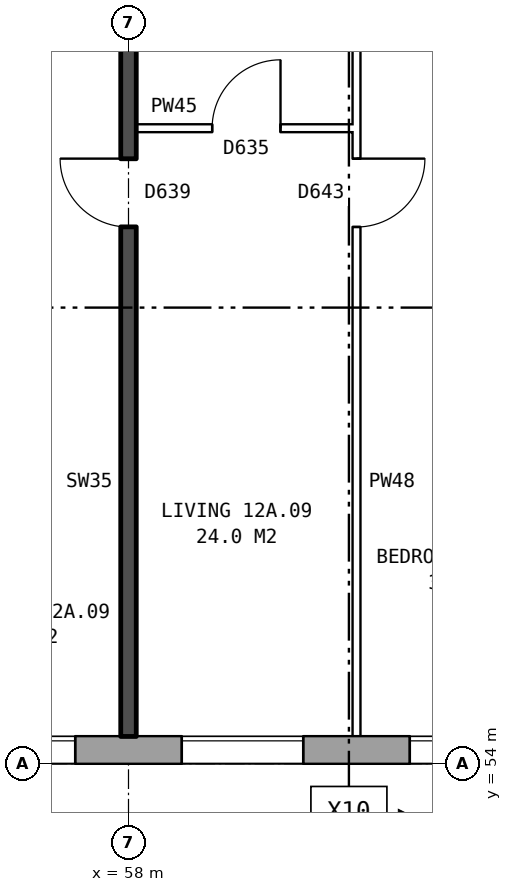
"""IFC4 building model, lengths in metres.
Left out: names, types, materials, properties, quantities, classifications, styles, units other than length and angle.
Written with IfcOpenShell. Run it as: python <this file> out.ifc"""

import sys

from ifc_helpers import new_model, si_unit, direction, frame, frame_2d, origin, place, context, subcontext, project, spatial, rectangle, extrude, element, fill, save


model = new_model("IFC4")
c1 = context("Model", 3, precision=1e-05, world=origin(), true_north=direction((0.0, 1.0)))
c2 = subcontext(c1, "Body", "Model", "MODEL_VIEW")
j1 = project(units=[si_unit("LENGTHUNIT", "METRE"), si_unit("PLANEANGLEUNIT", "RADIAN")], contexts=[c1])
p1 = place(None, origin())
s1 = spatial("IfcSite", under=j1, at=p1, CompositionType="ELEMENT")
p2 = place(p1, origin())
s2 = spatial("IfcBuilding", under=s1, at=p2, CompositionType="ELEMENT")
p3 = place(p2, frame((0.0, 0.0, 47.4)))
s3 = spatial("IfcBuildingStorey", under=s2, at=p3, CompositionType="ELEMENT", Elevation=47.4)
p4 = place(p3, frame((24.575, 54.18, 0.0), z_axis=(0.0, 0.0, 1.0), x_axis=(1.0, 0.0, 0.0)))
e1 = element("IfcWall", 1, at=p4, inside=s3, PredefinedType="STANDARD", context=c2, shape_type="SweptSolid", body=[
    extrude(rectangle(XDim=48.351, YDim=0.36, at=frame_2d((24.175, 0.0))), origin(), (0.0, 0.0, 1.0), 2.85),
])
p5 = place(p4, frame((1.125, 0.0, 0.8)))
e2 = element("IfcOpeningElement", 2, at=p5, cuts=e1, PredefinedType="OPENING", context=c2, shape_type="SweptSolid", body=[
    extrude(rectangle(XDim=1.6, YDim=1.8, at=frame_2d((0.8, 0.9))), frame((0.0, 0.19, 0.0), z_axis=(0.0, -1.0, 0.0), x_axis=(1.0, 0.0, 0.0)), (0.0, 0.0, 1.0), 0.38),
])
p6 = place(p4, frame((5.625, 0.0, 0.8)))
e3 = element("IfcOpeningElement", 3, at=p6, cuts=e1, PredefinedType="OPENING", context=c2, shape_type="SweptSolid", body=[
    extrude(rectangle(XDim=1.2, YDim=1.2, at=frame_2d((0.6, 0.6))), frame((0.0, 0.19, 0.0), z_axis=(0.0, -1.0, 0.0), x_axis=(1.0, 0.0, 0.0)), (0.0, 0.0, 1.0), 0.38),
])
p7 = place(p4, frame((7.125, 0.0, 0.8)))
e4 = element("IfcOpeningElement", 4, at=p7, cuts=e1, PredefinedType="OPENING", context=c2, shape_type="SweptSolid", body=[
    extrude(rectangle(XDim=1.6, YDim=1.8, at=frame_2d((0.8, 0.9))), frame((0.0, 0.19, 0.0), z_axis=(0.0, -1.0, 0.0), x_axis=(1.0, 0.0, 0.0)), (0.0, 0.0, 1.0), 0.38),
])
p8 = place(p4, frame((10.125, 0.0, 0.8)))
e5 = element("IfcOpeningElement", 5, at=p8, cuts=e1, PredefinedType="OPENING", context=c2, shape_type="SweptSolid", body=[
    extrude(rectangle(XDim=1.6, YDim=1.8, at=frame_2d((0.8, 0.9))), frame((0.0, 0.19, 0.0), z_axis=(0.0, -1.0, 0.0), x_axis=(1.0, 0.0, 0.0)), (0.0, 0.0, 1.0), 0.38),
])
p9 = place(p4, frame((13.125, 0.0, 0.8)))
e6 = element("IfcOpeningElement", 6, at=p9, cuts=e1, PredefinedType="OPENING", context=c2, shape_type="SweptSolid", body=[
    extrude(rectangle(XDim=1.6, YDim=1.8, at=frame_2d((0.8, 0.9))), frame((0.0, 0.19, 0.0), z_axis=(0.0, -1.0, 0.0), x_axis=(1.0, 0.0, 0.0)), (0.0, 0.0, 1.0), 0.38),
])
p10 = place(p4, frame((16.125, 0.0, 0.8)))
e7 = element("IfcOpeningElement", 7, at=p10, cuts=e1, PredefinedType="OPENING", context=c2, shape_type="SweptSolid", body=[
    extrude(rectangle(XDim=1.6, YDim=1.8, at=frame_2d((0.8, 0.9))), frame((0.0, 0.19, 0.0), z_axis=(0.0, -1.0, 0.0), x_axis=(1.0, 0.0, 0.0)), (0.0, 0.0, 1.0), 0.38),
])
p11 = place(p4, frame((19.125, 0.0, 0.8)))
e8 = element("IfcOpeningElement", 8, at=p11, cuts=e1, PredefinedType="OPENING", context=c2, shape_type="SweptSolid", body=[
    extrude(rectangle(XDim=1.6, YDim=1.8, at=frame_2d((0.8, 0.9))), frame((0.0, 0.19, 0.0), z_axis=(0.0, -1.0, 0.0), x_axis=(1.0, 0.0, 0.0)), (0.0, 0.0, 1.0), 0.38),
])
p12 = place(p4, frame((22.125, 0.0, 0.8)))
e9 = element("IfcOpeningElement", 9, at=p12, cuts=e1, PredefinedType="OPENING", context=c2, shape_type="SweptSolid", body=[
    extrude(rectangle(XDim=1.6, YDim=1.8, at=frame_2d((0.8, 0.9))), frame((0.0, 0.19, 0.0), z_axis=(0.0, -1.0, 0.0), x_axis=(1.0, 0.0, 0.0)), (0.0, 0.0, 1.0), 0.38),
])
p13 = place(p4, frame((25.125, 0.0, 0.8)))
e10 = element("IfcOpeningElement", 10, at=p13, cuts=e1, PredefinedType="OPENING", context=c2, shape_type="SweptSolid", body=[
    extrude(rectangle(XDim=1.6, YDim=1.8, at=frame_2d((0.8, 0.9))), frame((0.0, 0.19, 0.0), z_axis=(0.0, -1.0, 0.0), x_axis=(1.0, 0.0, 0.0)), (0.0, 0.0, 1.0), 0.38),
])
p14 = place(p4, frame((28.125, 0.0, 0.8)))
e11 = element("IfcOpeningElement", 11, at=p14, cuts=e1, PredefinedType="OPENING", context=c2, shape_type="SweptSolid", body=[
    extrude(rectangle(XDim=1.6, YDim=1.8, at=frame_2d((0.8, 0.9))), frame((0.0, 0.19, 0.0), z_axis=(0.0, -1.0, 0.0), x_axis=(1.0, 0.0, 0.0)), (0.0, 0.0, 1.0), 0.38),
])
p15 = place(p4, frame((31.125, 0.0, 0.8)))
e12 = element("IfcOpeningElement", 12, at=p15, cuts=e1, PredefinedType="OPENING", context=c2, shape_type="SweptSolid", body=[
    extrude(rectangle(XDim=1.6, YDim=1.8, at=frame_2d((0.8, 0.9))), frame((0.0, 0.19, 0.0), z_axis=(0.0, -1.0, 0.0), x_axis=(1.0, 0.0, 0.0)), (0.0, 0.0, 1.0), 0.38),
])
p16 = place(p4, frame((34.125, 0.0, 0.8)))
e13 = element("IfcOpeningElement", 13, at=p16, cuts=e1, PredefinedType="OPENING", context=c2, shape_type="SweptSolid", body=[
    extrude(rectangle(XDim=1.6, YDim=1.8, at=frame_2d((0.8, 0.9))), frame((0.0, 0.19, 0.0), z_axis=(0.0, -1.0, 0.0), x_axis=(1.0, 0.0, 0.0)), (0.0, 0.0, 1.0), 0.38),
])
p17 = place(p4, frame((37.125, 0.0, 0.8)))
e14 = element("IfcOpeningElement", 14, at=p17, cuts=e1, PredefinedType="OPENING", context=c2, shape_type="SweptSolid", body=[
    extrude(rectangle(XDim=1.6, YDim=1.8, at=frame_2d((0.8, 0.9))), frame((0.0, 0.19, 0.0), z_axis=(0.0, -1.0, 0.0), x_axis=(1.0, 0.0, 0.0)), (0.0, 0.0, 1.0), 0.38),
])
p18 = place(p4, frame((40.125, 0.0, 0.8)))
e15 = element("IfcOpeningElement", 15, at=p18, cuts=e1, PredefinedType="OPENING", context=c2, shape_type="SweptSolid", body=[
    extrude(rectangle(XDim=1.6, YDim=1.8, at=frame_2d((0.8, 0.9))), frame((0.0, 0.19, 0.0), z_axis=(0.0, -1.0, 0.0), x_axis=(1.0, 0.0, 0.0)), (0.0, 0.0, 1.0), 0.38),
])
p19 = place(p4, frame((42.025, 0.0, 0.8)))
e16 = element("IfcOpeningElement", 16, at=p19, cuts=e1, PredefinedType="OPENING", context=c2, shape_type="SweptSolid", body=[
    extrude(rectangle(XDim=1.0, YDim=0.9, at=frame_2d((0.5, 0.45))), frame((0.0, 0.19, 0.0), z_axis=(0.0, -1.0, 0.0), x_axis=(1.0, 0.0, 0.0)), (0.0, 0.0, 1.0), 0.38),
])
p20 = place(p4, frame((46.125, 0.0, 0.8)))
e17 = element("IfcOpeningElement", 17, at=p20, cuts=e1, PredefinedType="OPENING", context=c2, shape_type="SweptSolid", body=[
    extrude(rectangle(XDim=1.6, YDim=1.8, at=frame_2d((0.8, 0.9))), frame((0.0, 0.19, 0.0), z_axis=(0.0, -1.0, 0.0), x_axis=(1.0, 0.0, 0.0)), (0.0, 0.0, 1.0), 0.38),
])
p21 = place(p4, frame((44.525, 0.0, 1.7)))
e18 = element("IfcOpeningElement", 18, at=p21, cuts=e1, PredefinedType="OPENING", context=c2, shape_type="SweptSolid", body=[
    extrude(rectangle(XDim=0.6, YDim=0.9, at=frame_2d((0.3, 0.45))), frame((0.0, 0.19, 0.0), z_axis=(0.0, -1.0, 0.0), x_axis=(1.0, 0.0, 0.0)), (0.0, 0.0, 1.0), 0.38),
])
p22 = place(p3, frame((58.1, 62.36, 0.0), z_axis=(0.0, 0.0, 1.0), x_axis=(1.0, 0.0, 0.0)))
e19 = element("IfcWall", 19, at=p22, inside=s3, PredefinedType="PARTITIONING", context=c2, shape_type="SweptSolid", body=[
    extrude(rectangle(XDim=2.9, YDim=0.1, at=frame_2d((1.45, 0.0))), origin(), (0.0, 0.0, 1.0), 2.85),
])
p23 = place(p22, frame((1.0, 0.0, 0.0)))
e20 = element("IfcOpeningElement", 20, at=p23, cuts=e19, PredefinedType="OPENING", context=c2, shape_type="SweptSolid", body=[
    extrude(rectangle(XDim=0.9, YDim=2.1, at=frame_2d((0.45, 1.05))), frame((0.0, 0.06, 0.0), z_axis=(0.0, -1.0, 0.0), x_axis=(1.0, 0.0, 0.0)), (0.0, 0.0, 1.0), 0.12),
])
p24 = place(p3, frame((58.0, 54.36, 0.0), z_axis=(0.0, 0.0, 1.0), x_axis=(0.0, 1.0, 0.0)))
e21 = element("IfcWall", 21, at=p24, inside=s3, PredefinedType="SOLIDWALL", context=c2, shape_type="SweptSolid", body=[
    extrude(rectangle(XDim=14.44, YDim=0.2, at=frame_2d((7.22, 0.0))), origin(), (0.0, 0.0, 1.0), 2.85),
])
p25 = place(p24, frame((6.7, 0.0, 0.0)))
e22 = element("IfcOpeningElement", 22, at=p25, cuts=e21, PredefinedType="OPENING", context=c2, shape_type="SweptSolid", body=[
    extrude(rectangle(XDim=0.9, YDim=2.1, at=frame_2d((0.45, 1.05))), frame((0.0, 0.11, 0.0), z_axis=(0.0, -1.0, 0.0), x_axis=(1.0, 0.0, 0.0)), (0.0, 0.0, 1.0), 0.22),
])
p26 = place(p24, frame((13.14, 0.0, 0.0)))
e23 = element("IfcOpeningElement", 23, at=p26, cuts=e21, PredefinedType="OPENING", context=c2, shape_type="SweptSolid", body=[
    extrude(rectangle(XDim=0.9, YDim=2.1, at=frame_2d((0.45, 1.05))), frame((0.0, 0.11, 0.0), z_axis=(0.0, -1.0, 0.0), x_axis=(1.0, 0.0, 0.0)), (0.0, 0.0, 1.0), 0.22),
])
p27 = place(p3, frame((61.0, 54.36, 0.0), z_axis=(0.0, 0.0, 1.0), x_axis=(0.0, 1.0, 0.0)))
e24 = element("IfcWall", 24, at=p27, inside=s3, PredefinedType="PARTITIONING", context=c2, shape_type="SweptSolid", body=[
    extrude(rectangle(XDim=14.34, YDim=0.1, at=frame_2d((7.17, 0.0))), origin(), (0.0, 0.0, 1.0), 2.85),
])
p28 = place(p27, frame((6.7, 0.0, 0.0)))
e25 = element("IfcOpeningElement", 25, at=p28, cuts=e24, PredefinedType="OPENING", context=c2, shape_type="SweptSolid", body=[
    extrude(rectangle(XDim=0.9, YDim=2.1, at=frame_2d((0.45, 1.05))), frame((0.0, 0.06, 0.0), z_axis=(0.0, -1.0, 0.0), x_axis=(1.0, 0.0, 0.0)), (0.0, 0.0, 1.0), 0.12),
])
p29 = place(p27, frame((13.04, 0.0, 0.0)))
e26 = element("IfcOpeningElement", 26, at=p29, cuts=e24, PredefinedType="OPENING", context=c2, shape_type="SweptSolid", body=[
    extrude(rectangle(XDim=0.9, YDim=2.1, at=frame_2d((0.45, 1.05))), frame((0.0, 0.06, 0.0), z_axis=(0.0, -1.0, 0.0), x_axis=(1.0, 0.0, 0.0)), (0.0, 0.0, 1.0), 0.12),
])
p30 = place(p15, origin())
e27 = element("IfcWindow", 27, at=p30, inside=s3, PartitioningType="SINGLE_PANEL", PredefinedType="WINDOW", context=c2, shape_type="SweptSolid", body=[
    extrude(rectangle(XDim=1.6, YDim=1.8, at=frame_2d((0.8, 0.9))), frame((0.0, 0.15, 0.0), z_axis=(0.0, -1.0, 0.0), x_axis=(1.0, 0.0, 0.0)), (0.0, 0.0, 1.0), 0.06),
])
fill(e12, e27)
p31 = place(p16, origin())
e28 = element("IfcWindow", 28, at=p31, inside=s3, PartitioningType="SINGLE_PANEL", PredefinedType="WINDOW", context=c2, shape_type="SweptSolid", body=[
    extrude(rectangle(XDim=1.6, YDim=1.8, at=frame_2d((0.8, 0.9))), frame((0.0, 0.15, 0.0), z_axis=(0.0, -1.0, 0.0), x_axis=(1.0, 0.0, 0.0)), (0.0, 0.0, 1.0), 0.06),
])
fill(e13, e28)
p32 = place(p17, origin())
e29 = element("IfcWindow", 29, at=p32, inside=s3, PartitioningType="SINGLE_PANEL", PredefinedType="WINDOW", context=c2, shape_type="SweptSolid", body=[
    extrude(rectangle(XDim=1.6, YDim=1.8, at=frame_2d((0.8, 0.9))), frame((0.0, 0.15, 0.0), z_axis=(0.0, -1.0, 0.0), x_axis=(1.0, 0.0, 0.0)), (0.0, 0.0, 1.0), 0.06),
])
fill(e14, e29)
p33 = place(p28, frame((0.9, 0.0, 0.0), z_axis=(0.0, 0.0, 1.0), x_axis=(-1.0, 0.0, 0.0)))
e30 = element("IfcDoor", 30, at=p33, inside=s3, OperationType="SINGLE_SWING_LEFT", PredefinedType="DOOR", context=c2, shape_type="SweptSolid", body=[
    extrude(rectangle(XDim=0.9, YDim=2.1, at=frame_2d((0.45, 1.05))), frame((0.0, 0.025, 0.0), z_axis=(0.0, -1.0, 0.0), x_axis=(1.0, 0.0, 0.0)), (0.0, 0.0, 1.0), 0.05),
])
fill(e25, e30)
p34 = place(p25, origin())
e31 = element("IfcDoor", 31, at=p34, inside=s3, OperationType="SINGLE_SWING_RIGHT", PredefinedType="DOOR", context=c2, shape_type="SweptSolid", body=[
    extrude(rectangle(XDim=0.9, YDim=2.1, at=frame_2d((0.45, 1.05))), frame((0.0, 0.025, 0.0), z_axis=(0.0, -1.0, 0.0), x_axis=(1.0, 0.0, 0.0)), (0.0, 0.0, 1.0), 0.05),
])
fill(e22, e31)
p35 = place(p23, origin())
e32 = element("IfcDoor", 32, at=p35, inside=s3, OperationType="SINGLE_SWING_RIGHT", PredefinedType="DOOR", context=c2, shape_type="SweptSolid", body=[
    extrude(rectangle(XDim=0.9, YDim=2.1, at=frame_2d((0.45, 1.05))), frame((0.0, 0.025, 0.0), z_axis=(0.0, -1.0, 0.0), x_axis=(1.0, 0.0, 0.0)), (0.0, 0.0, 1.0), 0.05),
])
fill(e20, e32)
save(model, sys.argv[1])
